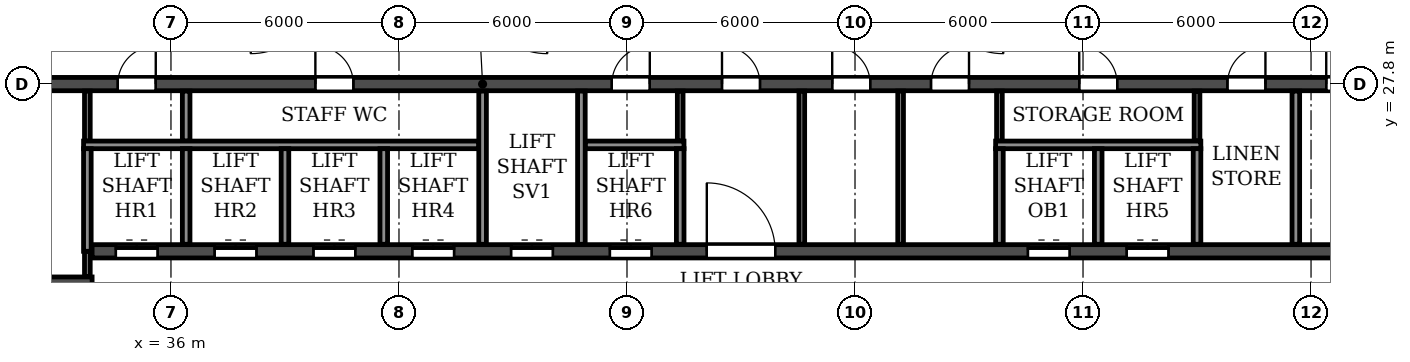
"""IFC4 building model, lengths in metres.
Left out: names, types, materials, properties, quantities, classifications, styles, units other than length and angle.
Written with IfcOpenShell. Run it as: python <this file> out.ifc"""

import sys

from ifc_helpers import new_model, si_unit, direction, frame, frame_2d, origin, place, context, subcontext, project, spatial, rectangle, extrude, element, fill, save


model = new_model("IFC4")
c1 = context("Model", 3, precision=1e-05, world=origin(), true_north=direction((0.0, 1.0)))
c2 = subcontext(c1, "Body", "Model", "MODEL_VIEW")
j1 = project(units=[si_unit("LENGTHUNIT", "METRE"), si_unit("PLANEANGLEUNIT", "RADIAN")], contexts=[c1])
p1 = place(None, origin())
s1 = spatial("IfcSite", under=j1, at=p1, CompositionType="ELEMENT")
p2 = place(p1, origin())
s2 = spatial("IfcBuilding", under=s1, at=p2, CompositionType="ELEMENT")
p3 = place(p2, frame((0.0, 0.0, 261.0)))
s3 = spatial("IfcBuildingStorey", under=s2, at=p3, CompositionType="ELEMENT", Elevation=261.0)
p4 = place(p3, frame((18.2, 27.8, 0.0), z_axis=(0.0, 0.0, 1.0), x_axis=(1.0, 0.0, 0.0)))
e1 = element("IfcWall", 1, at=p4, inside=s3, PredefinedType="SOLIDWALL", context=c2, shape_type="SweptSolid", body=[
    extrude(rectangle(XDim=65.6, YDim=0.35, at=frame_2d((32.8, 0.0))), origin(), (0.0, 0.0, 1.0), 5.7),
])
p5 = place(p4, frame((0.7, 0.0, 0.0)))
e2 = element("IfcOpeningElement", 2, at=p5, cuts=e1, PredefinedType="OPENING", context=c2, shape_type="SweptSolid", body=[
    extrude(rectangle(XDim=1.0, YDim=2.1, at=frame_2d((0.5, 1.05))), frame((0.0, 0.185, 0.0), z_axis=(0.0, -1.0, 0.0), x_axis=(1.0, 0.0, 0.0)), (0.0, 0.0, 1.0), 0.37),
])
p6 = place(p4, frame((4.05, 0.0, 0.0)))
e3 = element("IfcOpeningElement", 3, at=p6, cuts=e1, PredefinedType="OPENING", context=c2, shape_type="SweptSolid", body=[
    extrude(rectangle(XDim=0.9, YDim=2.1, at=frame_2d((0.45, 1.05))), frame((0.0, 0.185, 0.0), z_axis=(0.0, -1.0, 0.0), x_axis=(1.0, 0.0, 0.0)), (0.0, 0.0, 1.0), 0.37),
])
p7 = place(p4, frame((8.65, 0.0, 0.0)))
e4 = element("IfcOpeningElement", 4, at=p7, cuts=e1, PredefinedType="OPENING", context=c2, shape_type="SweptSolid", body=[
    extrude(rectangle(XDim=0.9, YDim=2.1, at=frame_2d((0.45, 1.05))), frame((0.0, 0.185, 0.0), z_axis=(0.0, -1.0, 0.0), x_axis=(1.0, 0.0, 0.0)), (0.0, 0.0, 1.0), 0.37),
])
p8 = place(p4, frame((13.25, 0.0, 0.0)))
e5 = element("IfcOpeningElement", 5, at=p8, cuts=e1, PredefinedType="OPENING", context=c2, shape_type="SweptSolid", body=[
    extrude(rectangle(XDim=0.9, YDim=2.1, at=frame_2d((0.45, 1.05))), frame((0.0, 0.185, 0.0), z_axis=(0.0, -1.0, 0.0), x_axis=(1.0, 0.0, 0.0)), (0.0, 0.0, 1.0), 0.37),
])
p9 = place(p4, frame((16.4, 0.0, 0.0)))
e6 = element("IfcOpeningElement", 6, at=p9, cuts=e1, PredefinedType="OPENING", context=c2, shape_type="SweptSolid", body=[
    extrude(rectangle(XDim=1.0, YDim=2.1, at=frame_2d((0.5, 1.05))), frame((0.0, 0.185, 0.0), z_axis=(0.0, -1.0, 0.0), x_axis=(1.0, 0.0, 0.0)), (0.0, 0.0, 1.0), 0.37),
])
p10 = place(p4, frame((21.6, 0.0, 0.0)))
e7 = element("IfcOpeningElement", 7, at=p10, cuts=e1, PredefinedType="OPENING", context=c2, shape_type="SweptSolid", body=[
    extrude(rectangle(XDim=1.0, YDim=2.1, at=frame_2d((0.5, 1.05))), frame((0.0, 0.185, 0.0), z_axis=(0.0, -1.0, 0.0), x_axis=(1.0, 0.0, 0.0)), (0.0, 0.0, 1.0), 0.37),
])
p11 = place(p4, frame((29.4, 0.0, 0.0)))
e8 = element("IfcOpeningElement", 8, at=p11, cuts=e1, PredefinedType="OPENING", context=c2, shape_type="SweptSolid", body=[
    extrude(rectangle(XDim=1.0, YDim=2.1, at=frame_2d((0.5, 1.05))), frame((0.0, 0.185, 0.0), z_axis=(0.0, -1.0, 0.0), x_axis=(1.0, 0.0, 0.0)), (0.0, 0.0, 1.0), 0.37),
])
p12 = place(p4, frame((32.3, 0.0, 0.0)))
e9 = element("IfcOpeningElement", 9, at=p12, cuts=e1, PredefinedType="OPENING", context=c2, shape_type="SweptSolid", body=[
    extrude(rectangle(XDim=1.0, YDim=2.1, at=frame_2d((0.5, 1.05))), frame((0.0, 0.185, 0.0), z_axis=(0.0, -1.0, 0.0), x_axis=(1.0, 0.0, 0.0)), (0.0, 0.0, 1.0), 0.37),
])
p13 = place(p4, frame((35.2, 0.0, 0.0)))
e10 = element("IfcOpeningElement", 10, at=p13, cuts=e1, PredefinedType="OPENING", context=c2, shape_type="SweptSolid", body=[
    extrude(rectangle(XDim=1.0, YDim=2.1, at=frame_2d((0.5, 1.05))), frame((0.0, 0.185, 0.0), z_axis=(0.0, -1.0, 0.0), x_axis=(1.0, 0.0, 0.0)), (0.0, 0.0, 1.0), 0.37),
])
p14 = place(p4, frame((37.8, 0.0, 0.0)))
e11 = element("IfcOpeningElement", 11, at=p14, cuts=e1, PredefinedType="OPENING", context=c2, shape_type="SweptSolid", body=[
    extrude(rectangle(XDim=1.0, YDim=2.1, at=frame_2d((0.5, 1.05))), frame((0.0, 0.185, 0.0), z_axis=(0.0, -1.0, 0.0), x_axis=(1.0, 0.0, 0.0)), (0.0, 0.0, 1.0), 0.37),
])
p15 = place(p4, frame((41.7, 0.0, 0.0)))
e12 = element("IfcOpeningElement", 12, at=p15, cuts=e1, PredefinedType="OPENING", context=c2, shape_type="SweptSolid", body=[
    extrude(rectangle(XDim=1.0, YDim=2.1, at=frame_2d((0.5, 1.05))), frame((0.0, 0.185, 0.0), z_axis=(0.0, -1.0, 0.0), x_axis=(1.0, 0.0, 0.0)), (0.0, 0.0, 1.0), 0.37),
])
p16 = place(p4, frame((45.6, 0.0, 0.0)))
e13 = element("IfcOpeningElement", 13, at=p16, cuts=e1, PredefinedType="OPENING", context=c2, shape_type="SweptSolid", body=[
    extrude(rectangle(XDim=1.0, YDim=2.1, at=frame_2d((0.5, 1.05))), frame((0.0, 0.185, 0.0), z_axis=(0.0, -1.0, 0.0), x_axis=(1.0, 0.0, 0.0)), (0.0, 0.0, 1.0), 0.37),
])
p17 = place(p4, frame((48.2, 0.0, 0.0)))
e14 = element("IfcOpeningElement", 14, at=p17, cuts=e1, PredefinedType="OPENING", context=c2, shape_type="SweptSolid", body=[
    extrude(rectangle(XDim=1.0, YDim=2.1, at=frame_2d((0.5, 1.05))), frame((0.0, 0.185, 0.0), z_axis=(0.0, -1.0, 0.0), x_axis=(1.0, 0.0, 0.0)), (0.0, 0.0, 1.0), 0.37),
])
p18 = place(p4, frame((51.45, 0.0, 0.0)))
e15 = element("IfcOpeningElement", 15, at=p18, cuts=e1, PredefinedType="OPENING", context=c2, shape_type="SweptSolid", body=[
    extrude(rectangle(XDim=0.9, YDim=2.1, at=frame_2d((0.45, 1.05))), frame((0.0, 0.185, 0.0), z_axis=(0.0, -1.0, 0.0), x_axis=(1.0, 0.0, 0.0)), (0.0, 0.0, 1.0), 0.37),
])
p19 = place(p4, frame((56.05, 0.0, 0.0)))
e16 = element("IfcOpeningElement", 16, at=p19, cuts=e1, PredefinedType="OPENING", context=c2, shape_type="SweptSolid", body=[
    extrude(rectangle(XDim=0.9, YDim=2.1, at=frame_2d((0.45, 1.05))), frame((0.0, 0.185, 0.0), z_axis=(0.0, -1.0, 0.0), x_axis=(1.0, 0.0, 0.0)), (0.0, 0.0, 1.0), 0.37),
])
p20 = place(p4, frame((60.65, 0.0, 0.0)))
e17 = element("IfcOpeningElement", 17, at=p20, cuts=e1, PredefinedType="OPENING", context=c2, shape_type="SweptSolid", body=[
    extrude(rectangle(XDim=0.9, YDim=2.1, at=frame_2d((0.45, 1.05))), frame((0.0, 0.185, 0.0), z_axis=(0.0, -1.0, 0.0), x_axis=(1.0, 0.0, 0.0)), (0.0, 0.0, 1.0), 0.37),
])
p21 = place(p4, frame((63.9, 0.0, 0.0)))
e18 = element("IfcOpeningElement", 18, at=p21, cuts=e1, PredefinedType="OPENING", context=c2, shape_type="SweptSolid", body=[
    extrude(rectangle(XDim=1.0, YDim=2.1, at=frame_2d((0.5, 1.05))), frame((0.0, 0.185, 0.0), z_axis=(0.0, -1.0, 0.0), x_axis=(1.0, 0.0, 0.0)), (0.0, 0.0, 1.0), 0.37),
])
p22 = place(p3, frame((33.925, 23.4, 0.0), z_axis=(0.0, 0.0, 1.0), x_axis=(1.0, 0.0, 0.0)))
e19 = element("IfcWall", 19, at=p22, inside=s3, PredefinedType="SOLIDWALL", context=c2, shape_type="SweptSolid", body=[
    extrude(rectangle(XDim=34.15, YDim=0.35, at=frame_2d((17.075, 0.0))), origin(), (0.0, 0.0, 1.0), 5.7),
])
p23 = place(p22, frame((16.175, 0.0, 0.0)))
e20 = element("IfcOpeningElement", 20, at=p23, cuts=e19, PredefinedType="OPENING", context=c2, shape_type="SweptSolid", body=[
    extrude(rectangle(XDim=1.8, YDim=2.1, at=frame_2d((0.9, 1.05))), frame((0.0, 0.185, 0.0), z_axis=(0.0, -1.0, 0.0), x_axis=(1.0, 0.0, 0.0)), (0.0, 0.0, 1.0), 0.37),
])
p24 = place(p22, frame((0.625, 0.0, 0.0)))
e21 = element("IfcOpeningElement", 21, at=p24, cuts=e19, PredefinedType="OPENING", context=c2, shape_type="SweptSolid", body=[
    extrude(rectangle(XDim=1.1, YDim=2.1, at=frame_2d((0.55, 1.05))), frame((0.0, 0.185, 0.0), z_axis=(0.0, -1.0, 0.0), x_axis=(1.0, 0.0, 0.0)), (0.0, 0.0, 1.0), 0.37),
])
p25 = place(p22, frame((3.225, 0.0, 0.0)))
e22 = element("IfcOpeningElement", 22, at=p25, cuts=e19, PredefinedType="OPENING", context=c2, shape_type="SweptSolid", body=[
    extrude(rectangle(XDim=1.1, YDim=2.1, at=frame_2d((0.55, 1.05))), frame((0.0, 0.185, 0.0), z_axis=(0.0, -1.0, 0.0), x_axis=(1.0, 0.0, 0.0)), (0.0, 0.0, 1.0), 0.37),
])
p26 = place(p22, frame((5.825, 0.0, 0.0)))
e23 = element("IfcOpeningElement", 23, at=p26, cuts=e19, PredefinedType="OPENING", context=c2, shape_type="SweptSolid", body=[
    extrude(rectangle(XDim=1.1, YDim=2.1, at=frame_2d((0.55, 1.05))), frame((0.0, 0.185, 0.0), z_axis=(0.0, -1.0, 0.0), x_axis=(1.0, 0.0, 0.0)), (0.0, 0.0, 1.0), 0.37),
])
p27 = place(p22, frame((8.425, 0.0, 0.0)))
e24 = element("IfcOpeningElement", 24, at=p27, cuts=e19, PredefinedType="OPENING", context=c2, shape_type="SweptSolid", body=[
    extrude(rectangle(XDim=1.1, YDim=2.1, at=frame_2d((0.55, 1.05))), frame((0.0, 0.185, 0.0), z_axis=(0.0, -1.0, 0.0), x_axis=(1.0, 0.0, 0.0)), (0.0, 0.0, 1.0), 0.37),
])
p28 = place(p22, frame((11.025, 0.0, 0.0)))
e25 = element("IfcOpeningElement", 25, at=p28, cuts=e19, PredefinedType="OPENING", context=c2, shape_type="SweptSolid", body=[
    extrude(rectangle(XDim=1.1, YDim=2.1, at=frame_2d((0.55, 1.05))), frame((0.0, 0.185, 0.0), z_axis=(0.0, -1.0, 0.0), x_axis=(1.0, 0.0, 0.0)), (0.0, 0.0, 1.0), 0.37),
])
p29 = place(p22, frame((13.625, 0.0, 0.0)))
e26 = element("IfcOpeningElement", 26, at=p29, cuts=e19, PredefinedType="OPENING", context=c2, shape_type="SweptSolid", body=[
    extrude(rectangle(XDim=1.1, YDim=2.1, at=frame_2d((0.55, 1.05))), frame((0.0, 0.185, 0.0), z_axis=(0.0, -1.0, 0.0), x_axis=(1.0, 0.0, 0.0)), (0.0, 0.0, 1.0), 0.37),
])
p30 = place(p22, frame((24.625, 0.0, 0.0)))
e27 = element("IfcOpeningElement", 27, at=p30, cuts=e19, PredefinedType="OPENING", context=c2, shape_type="SweptSolid", body=[
    extrude(rectangle(XDim=1.1, YDim=2.1, at=frame_2d((0.55, 1.05))), frame((0.0, 0.185, 0.0), z_axis=(0.0, -1.0, 0.0), x_axis=(1.0, 0.0, 0.0)), (0.0, 0.0, 1.0), 0.37),
])
p31 = place(p22, frame((27.225, 0.0, 0.0)))
e28 = element("IfcOpeningElement", 28, at=p31, cuts=e19, PredefinedType="OPENING", context=c2, shape_type="SweptSolid", body=[
    extrude(rectangle(XDim=1.1, YDim=2.1, at=frame_2d((0.55, 1.05))), frame((0.0, 0.185, 0.0), z_axis=(0.0, -1.0, 0.0), x_axis=(1.0, 0.0, 0.0)), (0.0, 0.0, 1.0), 0.37),
])
p32 = place(p3, frame((29.875, 22.6, 0.0), z_axis=(0.0, 0.0, 1.0), x_axis=(1.0, 0.0, 0.0)))
e29 = element("IfcWall", 29, at=p32, inside=s3, PredefinedType="SOLIDWALL", context=c2, shape_type="SweptSolid", body=[
    extrude(rectangle(XDim=4.05, YDim=0.25, at=frame_2d((2.025, 0.0))), origin(), (0.0, 0.0, 1.0), 5.7),
])
p33 = place(p3, frame((49.4, 26.3, 0.0), z_axis=(0.0, 0.0, 1.0), x_axis=(0.0, 1.0, 0.0)))
e30 = element("IfcWall", 30, at=p33, inside=s3, PredefinedType="PARTITIONING", context=c2, shape_type="SweptSolid", body=[
    extrude(rectangle(XDim=1.315, YDim=0.15, at=frame_2d((0.657, 0.0))), origin(), (0.0, 0.0, 1.0), 5.7),
])
for number, where, z_axis, x_axis in (
    (31, (52.6, 23.585, 0.0), (0.0, 0.0, 1.0), (0.0, 1.0, 0.0)),
    (32, (55.2, 23.585, 0.0), (0.0, 0.0, 1.0), (0.0, 1.0, 0.0)),
):
    element("IfcWall", number, at=place(p3, frame(where, z_axis=z_axis, x_axis=x_axis)), inside=s3, PredefinedType="PARTITIONING", context=c2, shape_type="SweptSolid", body=[
        extrude(rectangle(XDim=4.03, YDim=0.15, at=frame_2d((2.015, 0.0))), origin(), (0.0, 0.0, 1.0), 5.7),
    ])
for number, where, z_axis, x_axis in (
    (33, (57.8, 26.3, 0.0), (0.0, 0.0, 1.0), (0.0, 1.0, 0.0)),
    (34, (63.0, 26.3, 0.0), (0.0, 0.0, 1.0), (0.0, 1.0, 0.0)),
):
    element("IfcWall", number, at=place(p3, frame(where, z_axis=z_axis, x_axis=x_axis)), inside=s3, PredefinedType="PARTITIONING", context=c2, shape_type="SweptSolid", body=[
        extrude(rectangle(XDim=1.315, YDim=0.15, at=frame_2d((0.657, 0.0))), origin(), (0.0, 0.0, 1.0), 5.7),
    ])
p34 = place(p3, frame((36.4, 26.3, 0.0), z_axis=(0.0, 0.0, 1.0), x_axis=(0.0, 1.0, 0.0)))
e35 = element("IfcWall", 35, at=p34, inside=s3, PredefinedType="PARTITIONING", context=c2, shape_type="SweptSolid", body=[
    extrude(rectangle(XDim=1.315, YDim=0.2, at=frame_2d((0.657, 0.0))), origin(), (0.0, 0.0, 1.0), 5.7),
])
p35 = place(p3, frame((65.6, 23.585, 0.0), z_axis=(0.0, 0.0, 1.0), x_axis=(0.0, 1.0, 0.0)))
e36 = element("IfcWall", 36, at=p35, inside=s3, PredefinedType="PARTITIONING", context=c2, shape_type="SweptSolid", body=[
    extrude(rectangle(XDim=4.03, YDim=0.2, at=frame_2d((2.015, 0.0))), origin(), (0.0, 0.0, 1.0), 5.7),
])
p36 = place(p3, frame((33.8, 22.735, 0.0), z_axis=(0.0, 0.0, 1.0), x_axis=(0.0, 1.0, 0.0)))
e37 = element("IfcWall", 37, at=p36, inside=s3, PredefinedType="PARTITIONING", context=c2, shape_type="SweptSolid", body=[
    extrude(rectangle(XDim=0.665, YDim=0.15, at=frame_2d((0.333, 0.0))), origin(), (0.0, 0.0, 1.0), 5.7),
])
p37 = place(p3, frame((33.8, 26.3, 0.0), z_axis=(0.0, 0.0, 1.0), x_axis=(0.0, 1.0, 0.0)))
e38 = element("IfcWall", 38, at=p37, inside=s3, PredefinedType="PARTITIONING", context=c2, shape_type="SweptSolid", body=[
    extrude(rectangle(XDim=1.315, YDim=0.15, at=frame_2d((0.657, 0.0))), origin(), (0.0, 0.0, 1.0), 5.7),
])
p38 = place(p3, frame((33.7, 26.2, 0.0), z_axis=(0.0, 0.0, 1.0), x_axis=(1.0, 0.0, 0.0)))
e39 = element("IfcWall", 39, at=p38, inside=s3, PredefinedType="PARTITIONING", context=c2, shape_type="SweptSolid", body=[
    extrude(rectangle(XDim=10.4, YDim=0.2, at=frame_2d((5.2, 0.0))), origin(), (0.0, 0.0, 1.0), 5.7),
])
p39 = place(p3, frame((46.9, 26.2, 0.0), z_axis=(0.0, 0.0, 1.0), x_axis=(1.0, 0.0, 0.0)))
e40 = element("IfcWall", 40, at=p39, inside=s3, PredefinedType="PARTITIONING", context=c2, shape_type="SweptSolid", body=[
    extrude(rectangle(XDim=2.6, YDim=0.2, at=frame_2d((1.3, 0.0))), origin(), (0.0, 0.0, 1.0), 5.7),
])
p40 = place(p3, frame((57.7, 26.2, 0.0), z_axis=(0.0, 0.0, 1.0), x_axis=(1.0, 0.0, 0.0)))
e41 = element("IfcWall", 41, at=p40, inside=s3, PredefinedType="PARTITIONING", context=c2, shape_type="SweptSolid", body=[
    extrude(rectangle(XDim=5.4, YDim=0.2, at=frame_2d((2.7, 0.0))), origin(), (0.0, 0.0, 1.0), 5.7),
])
p41 = place(p3, frame((33.8, 23.4, 0.0), z_axis=(0.0, 0.0, 1.0), x_axis=(0.0, 1.0, 0.0)))
e42 = element("IfcWall", 42, at=p41, inside=s3, PredefinedType="PARTITIONING", context=c2, shape_type="SweptSolid", body=[
    extrude(rectangle(XDim=2.7, YDim=0.2, at=frame_2d((1.35, 0.0))), origin(), (0.0, 0.0, 1.0), 5.7),
])
for number, where, z_axis, x_axis in (
    (43, (36.4, 23.585, 0.0), (0.0, 0.0, 1.0), (0.0, 1.0, 0.0)),
    (44, (39.0, 23.585, 0.0), (0.0, 0.0, 1.0), (0.0, 1.0, 0.0)),
    (45, (41.6, 23.585, 0.0), (0.0, 0.0, 1.0), (0.0, 1.0, 0.0)),
):
    element("IfcWall", number, at=place(p3, frame(where, z_axis=z_axis, x_axis=x_axis)), inside=s3, PredefinedType="PARTITIONING", context=c2, shape_type="SweptSolid", body=[
        extrude(rectangle(XDim=2.515, YDim=0.2, at=frame_2d((1.258, 0.0))), origin(), (0.0, 0.0, 1.0), 5.7),
    ])
for number, where, z_axis, x_axis in (
    (46, (44.2, 23.585, 0.0), (0.0, 0.0, 1.0), (0.0, 1.0, 0.0)),
    (47, (46.8, 23.585, 0.0), (0.0, 0.0, 1.0), (0.0, 1.0, 0.0)),
):
    element("IfcWall", number, at=place(p3, frame(where, z_axis=z_axis, x_axis=x_axis)), inside=s3, PredefinedType="PARTITIONING", context=c2, shape_type="SweptSolid", body=[
        extrude(rectangle(XDim=4.03, YDim=0.2, at=frame_2d((2.015, 0.0))), origin(), (0.0, 0.0, 1.0), 5.7),
    ])
for number, where, z_axis, x_axis in (
    (48, (49.4, 23.585, 0.0), (0.0, 0.0, 1.0), (0.0, 1.0, 0.0)),
    (49, (57.8, 23.585, 0.0), (0.0, 0.0, 1.0), (0.0, 1.0, 0.0)),
    (50, (60.4, 23.585, 0.0), (0.0, 0.0, 1.0), (0.0, 1.0, 0.0)),
    (51, (63.0, 23.585, 0.0), (0.0, 0.0, 1.0), (0.0, 1.0, 0.0)),
):
    element("IfcWall", number, at=place(p3, frame(where, z_axis=z_axis, x_axis=x_axis)), inside=s3, PredefinedType="PARTITIONING", context=c2, shape_type="SweptSolid", body=[
        extrude(rectangle(XDim=2.515, YDim=0.2, at=frame_2d((1.258, 0.0))), origin(), (0.0, 0.0, 1.0), 5.7),
    ])
p42 = place(p9, origin())
e52 = element("IfcDoor", 52, at=p42, inside=s3, OperationType="SINGLE_SWING_RIGHT", PredefinedType="DOOR", context=c2, shape_type="SweptSolid", body=[
    extrude(rectangle(XDim=1.0, YDim=2.1, at=frame_2d((0.5, 1.05))), frame((0.0, 0.025, 0.0), z_axis=(0.0, -1.0, 0.0), x_axis=(1.0, 0.0, 0.0)), (0.0, 0.0, 1.0), 0.05),
])
fill(e6, e52)
p43 = place(p10, origin())
e53 = element("IfcDoor", 53, at=p43, inside=s3, OperationType="SINGLE_SWING_LEFT", PredefinedType="DOOR", context=c2, shape_type="SweptSolid", body=[
    extrude(rectangle(XDim=1.0, YDim=2.1, at=frame_2d((0.5, 1.05))), frame((0.0, 0.025, 0.0), z_axis=(0.0, -1.0, 0.0), x_axis=(1.0, 0.0, 0.0)), (0.0, 0.0, 1.0), 0.05),
])
fill(e7, e53)
p44 = place(p11, origin())
e54 = element("IfcDoor", 54, at=p44, inside=s3, OperationType="SINGLE_SWING_RIGHT", PredefinedType="DOOR", context=c2, shape_type="SweptSolid", body=[
    extrude(rectangle(XDim=1.0, YDim=2.1, at=frame_2d((0.5, 1.05))), frame((0.0, 0.025, 0.0), z_axis=(0.0, -1.0, 0.0), x_axis=(1.0, 0.0, 0.0)), (0.0, 0.0, 1.0), 0.05),
])
fill(e8, e54)
p45 = place(p12, origin())
e55 = element("IfcDoor", 55, at=p45, inside=s3, OperationType="SINGLE_SWING_LEFT", PredefinedType="DOOR", context=c2, shape_type="SweptSolid", body=[
    extrude(rectangle(XDim=1.0, YDim=2.1, at=frame_2d((0.5, 1.05))), frame((0.0, 0.025, 0.0), z_axis=(0.0, -1.0, 0.0), x_axis=(1.0, 0.0, 0.0)), (0.0, 0.0, 1.0), 0.05),
])
fill(e9, e55)
p46 = place(p13, origin())
e56 = element("IfcDoor", 56, at=p46, inside=s3, OperationType="SINGLE_SWING_LEFT", PredefinedType="DOOR", context=c2, shape_type="SweptSolid", body=[
    extrude(rectangle(XDim=1.0, YDim=2.1, at=frame_2d((0.5, 1.05))), frame((0.0, 0.025, 0.0), z_axis=(0.0, -1.0, 0.0), x_axis=(1.0, 0.0, 0.0)), (0.0, 0.0, 1.0), 0.05),
])
fill(e10, e56)
p47 = place(p14, origin())
e57 = element("IfcDoor", 57, at=p47, inside=s3, OperationType="SINGLE_SWING_RIGHT", PredefinedType="DOOR", context=c2, shape_type="SweptSolid", body=[
    extrude(rectangle(XDim=1.0, YDim=2.1, at=frame_2d((0.5, 1.05))), frame((0.0, 0.025, 0.0), z_axis=(0.0, -1.0, 0.0), x_axis=(1.0, 0.0, 0.0)), (0.0, 0.0, 1.0), 0.05),
])
fill(e11, e57)
p48 = place(p15, origin())
e58 = element("IfcDoor", 58, at=p48, inside=s3, OperationType="SINGLE_SWING_LEFT", PredefinedType="DOOR", context=c2, shape_type="SweptSolid", body=[
    extrude(rectangle(XDim=1.0, YDim=2.1, at=frame_2d((0.5, 1.05))), frame((0.0, 0.025, 0.0), z_axis=(0.0, -1.0, 0.0), x_axis=(1.0, 0.0, 0.0)), (0.0, 0.0, 1.0), 0.05),
])
fill(e12, e58)
p49 = place(p16, origin())
e59 = element("IfcDoor", 59, at=p49, inside=s3, OperationType="SINGLE_SWING_RIGHT", PredefinedType="DOOR", context=c2, shape_type="SweptSolid", body=[
    extrude(rectangle(XDim=1.0, YDim=2.1, at=frame_2d((0.5, 1.05))), frame((0.0, 0.025, 0.0), z_axis=(0.0, -1.0, 0.0), x_axis=(1.0, 0.0, 0.0)), (0.0, 0.0, 1.0), 0.05),
])
fill(e13, e59)
p50 = place(p17, origin())
e60 = element("IfcDoor", 60, at=p50, inside=s3, OperationType="SINGLE_SWING_LEFT", PredefinedType="DOOR", context=c2, shape_type="SweptSolid", body=[
    extrude(rectangle(XDim=1.0, YDim=2.1, at=frame_2d((0.5, 1.05))), frame((0.0, 0.025, 0.0), z_axis=(0.0, -1.0, 0.0), x_axis=(1.0, 0.0, 0.0)), (0.0, 0.0, 1.0), 0.05),
])
fill(e14, e60)
p51 = place(p23, origin())
e61 = element("IfcDoor", 61, at=p51, inside=s3, OperationType="DOUBLE_DOOR_SINGLE_SWING", PredefinedType="DOOR", context=c2, shape_type="SweptSolid", body=[
    extrude(rectangle(XDim=1.8, YDim=2.1, at=frame_2d((0.9, 1.05))), frame((0.0, 0.025, 0.0), z_axis=(0.0, -1.0, 0.0), x_axis=(1.0, 0.0, 0.0)), (0.0, 0.0, 1.0), 0.05),
])
fill(e20, e61)
p52 = place(p24, origin())
e62 = element("IfcDoor", 62, at=p52, inside=s3, OperationType="DOUBLE_DOOR_SLIDING", PredefinedType="DOOR", context=c2, shape_type="SweptSolid", body=[
    extrude(rectangle(XDim=1.1, YDim=2.1, at=frame_2d((0.55, 1.05))), frame((0.0, 0.025, 0.0), z_axis=(0.0, -1.0, 0.0), x_axis=(1.0, 0.0, 0.0)), (0.0, 0.0, 1.0), 0.05),
])
fill(e21, e62)
p53 = place(p25, origin())
e63 = element("IfcDoor", 63, at=p53, inside=s3, OperationType="DOUBLE_DOOR_SLIDING", PredefinedType="DOOR", context=c2, shape_type="SweptSolid", body=[
    extrude(rectangle(XDim=1.1, YDim=2.1, at=frame_2d((0.55, 1.05))), frame((0.0, 0.025, 0.0), z_axis=(0.0, -1.0, 0.0), x_axis=(1.0, 0.0, 0.0)), (0.0, 0.0, 1.0), 0.05),
])
fill(e22, e63)
p54 = place(p26, origin())
e64 = element("IfcDoor", 64, at=p54, inside=s3, OperationType="DOUBLE_DOOR_SLIDING", PredefinedType="DOOR", context=c2, shape_type="SweptSolid", body=[
    extrude(rectangle(XDim=1.1, YDim=2.1, at=frame_2d((0.55, 1.05))), frame((0.0, 0.025, 0.0), z_axis=(0.0, -1.0, 0.0), x_axis=(1.0, 0.0, 0.0)), (0.0, 0.0, 1.0), 0.05),
])
fill(e23, e64)
p55 = place(p27, origin())
e65 = element("IfcDoor", 65, at=p55, inside=s3, OperationType="DOUBLE_DOOR_SLIDING", PredefinedType="DOOR", context=c2, shape_type="SweptSolid", body=[
    extrude(rectangle(XDim=1.1, YDim=2.1, at=frame_2d((0.55, 1.05))), frame((0.0, 0.025, 0.0), z_axis=(0.0, -1.0, 0.0), x_axis=(1.0, 0.0, 0.0)), (0.0, 0.0, 1.0), 0.05),
])
fill(e24, e65)
p56 = place(p28, origin())
e66 = element("IfcDoor", 66, at=p56, inside=s3, OperationType="DOUBLE_DOOR_SLIDING", PredefinedType="DOOR", context=c2, shape_type="SweptSolid", body=[
    extrude(rectangle(XDim=1.1, YDim=2.1, at=frame_2d((0.55, 1.05))), frame((0.0, 0.025, 0.0), z_axis=(0.0, -1.0, 0.0), x_axis=(1.0, 0.0, 0.0)), (0.0, 0.0, 1.0), 0.05),
])
fill(e25, e66)
p57 = place(p29, origin())
e67 = element("IfcDoor", 67, at=p57, inside=s3, OperationType="DOUBLE_DOOR_SLIDING", PredefinedType="DOOR", context=c2, shape_type="SweptSolid", body=[
    extrude(rectangle(XDim=1.1, YDim=2.1, at=frame_2d((0.55, 1.05))), frame((0.0, 0.025, 0.0), z_axis=(0.0, -1.0, 0.0), x_axis=(1.0, 0.0, 0.0)), (0.0, 0.0, 1.0), 0.05),
])
fill(e26, e67)
p58 = place(p30, origin())
e68 = element("IfcDoor", 68, at=p58, inside=s3, OperationType="DOUBLE_DOOR_SLIDING", PredefinedType="DOOR", context=c2, shape_type="SweptSolid", body=[
    extrude(rectangle(XDim=1.1, YDim=2.1, at=frame_2d((0.55, 1.05))), frame((0.0, 0.025, 0.0), z_axis=(0.0, -1.0, 0.0), x_axis=(1.0, 0.0, 0.0)), (0.0, 0.0, 1.0), 0.05),
])
fill(e27, e68)
p59 = place(p31, origin())
e69 = element("IfcDoor", 69, at=p59, inside=s3, OperationType="DOUBLE_DOOR_SLIDING", PredefinedType="DOOR", context=c2, shape_type="SweptSolid", body=[
    extrude(rectangle(XDim=1.1, YDim=2.1, at=frame_2d((0.55, 1.05))), frame((0.0, 0.025, 0.0), z_axis=(0.0, -1.0, 0.0), x_axis=(1.0, 0.0, 0.0)), (0.0, 0.0, 1.0), 0.05),
])
fill(e28, e69)
save(model, sys.argv[1])
